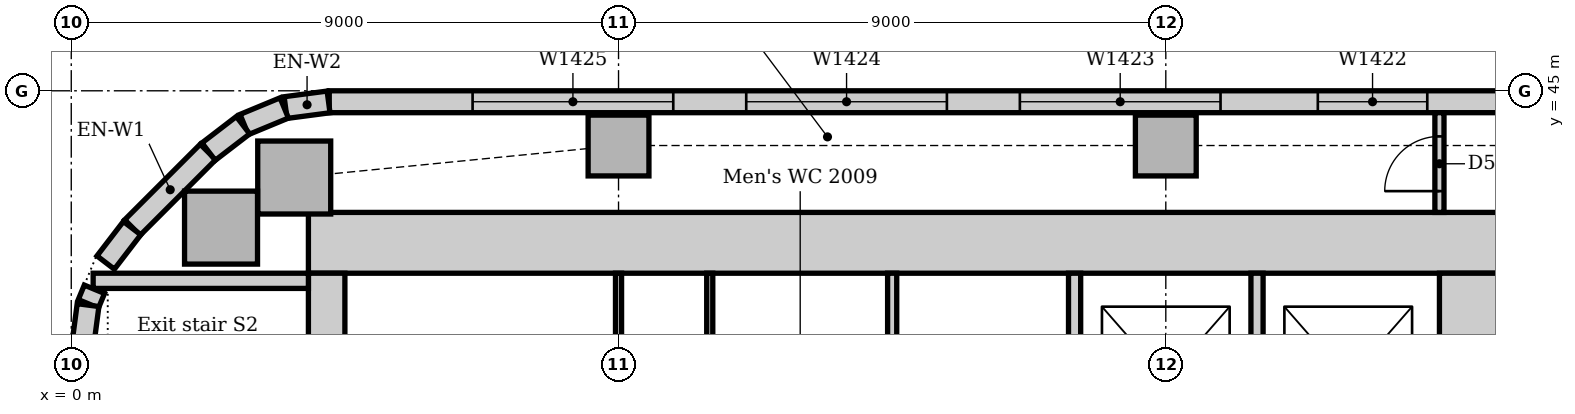
"""IFC4 building model, lengths in metres.
Left out: names, types, materials, properties, quantities, classifications, styles, units other than length and angle.
Written with IfcOpenShell. Run it as: python <this file> out.ifc"""

import sys

from ifc_helpers import new_model, si_unit, direction, frame, frame_2d, origin, origin_2d, place, context, subcontext, project, spatial, rectangle, extrude, element, fill, save


model = new_model("IFC4")
c1 = context("Model", 3, precision=1e-05, world=origin(), true_north=direction((0.0, 1.0)))
c2 = subcontext(c1, "Body", "Model", "MODEL_VIEW")
j1 = project(units=[si_unit("LENGTHUNIT", "METRE"), si_unit("PLANEANGLEUNIT", "RADIAN")], contexts=[c1])
p1 = place(None, origin())
s1 = spatial("IfcSite", under=j1, at=p1, CompositionType="ELEMENT")
p2 = place(p1, origin())
s2 = spatial("IfcBuilding", under=s1, at=p2, CompositionType="ELEMENT")
p3 = place(p2, frame((0.0, 0.0, 87.0)))
s3 = spatial("IfcBuildingStorey", under=s2, at=p3, CompositionType="ELEMENT", Elevation=87.0)
p4 = place(p3, frame((23.5, 42.5, 0.0), z_axis=(0.0, 0.0, 1.0), x_axis=(-1.0, 0.0, 0.0)))
e1 = element("IfcWall", 1, at=p4, inside=s3, PredefinedType="SOLIDWALL", context=c2, shape_type="SweptSolid", body=[
    extrude(rectangle(XDim=19.6, YDim=1.0, at=frame_2d((9.8, 0.0))), origin(), (0.0, 0.0, 1.0), 4.0),
])
p5 = place(p3, frame((23.0, 31.5, 0.0), z_axis=(0.0, 0.0, 1.0), x_axis=(0.0, 1.0, 0.0)))
e2 = element("IfcWall", 2, at=p5, inside=s3, PredefinedType="SOLIDWALL", context=c2, shape_type="SweptSolid", body=[
    extrude(rectangle(XDim=10.5, YDim=1.0, at=frame_2d((5.25, 0.0))), origin(), (0.0, 0.0, 1.0), 4.0),
])
p6 = place(p5, frame((3.15, 0.0, 0.0)))
e3 = element("IfcOpeningElement", 3, at=p6, cuts=e2, PredefinedType="OPENING", context=c2, shape_type="SweptSolid", body=[
    extrude(rectangle(XDim=1.0, YDim=2.1, at=frame_2d((0.5, 1.05))), frame((0.0, 0.51, 0.0), z_axis=(0.0, -1.0, 0.0), x_axis=(1.0, 0.0, 0.0)), (0.0, 0.0, 1.0), 1.02),
])
p7 = place(p5, frame((5.2, 0.0, 0.0)))
e4 = element("IfcOpeningElement", 4, at=p7, cuts=e2, PredefinedType="OPENING", context=c2, shape_type="SweptSolid", body=[
    extrude(rectangle(XDim=1.0, YDim=2.1, at=frame_2d((0.5, 1.05))), frame((0.0, 0.51, 0.0), z_axis=(0.0, -1.0, 0.0), x_axis=(1.0, 0.0, 0.0)), (0.0, 0.0, 1.0), 1.02),
])
p8 = place(p3, frame((4.2, 42.0, 0.0), z_axis=(0.0, 0.0, 1.0), x_axis=(0.0, -1.0, 0.0)))
e5 = element("IfcWall", 5, at=p8, inside=s3, PredefinedType="SOLIDWALL", context=c2, shape_type="SweptSolid", body=[
    extrude(rectangle(XDim=10.5, YDim=0.6, at=frame_2d((5.25, 0.0))), origin(), (0.0, 0.0, 1.0), 4.0),
])
p9 = place(p8, frame((5.3, 0.0, 0.0)))
e6 = element("IfcOpeningElement", 6, at=p9, cuts=e5, PredefinedType="OPENING", context=c2, shape_type="SweptSolid", body=[
    extrude(rectangle(XDim=1.0, YDim=2.1, at=frame_2d((0.5, 1.05))), frame((0.0, 0.31, 0.0), z_axis=(0.0, -1.0, 0.0), x_axis=(1.0, 0.0, 0.0)), (0.0, 0.0, 1.0), 0.62),
])
p10 = place(p3, frame((3.9, 41.875, 0.0), z_axis=(0.0, 0.0, 1.0), x_axis=(-1.0, 0.0, 0.0)))
e7 = element("IfcWall", 7, at=p10, inside=s3, PredefinedType="SOLIDWALL", context=c2, shape_type="SweptSolid", body=[
    extrude(rectangle(XDim=3.54, YDim=0.25, at=frame_2d((1.77, 0.0))), origin(), (0.0, 0.0, 1.0), 4.0),
])
for number, where, z_axis, x_axis in (
    (8, (3.667, 43.574, 0.0), (0.0, 0.0, 1.0), (1.0, 0.0, 0.0)),
    (9, (2.463, 42.75, 0.0), (0.0, 0.0, 1.0), (1.0, 0.0, 0.0)),
):
    element("IfcColumn", number, at=place(p3, frame(where, z_axis=z_axis, x_axis=x_axis)), inside=s3, PredefinedType="COLUMN", context=c2, shape_type="SweptSolid", body=[
        extrude(rectangle(XDim=1.2, YDim=1.2, at=origin_2d()), origin(), (0.0, 0.0, 1.0), 3.85),
    ])
for number, where, z_axis, x_axis in (
    (10, (9.0, 44.1, 0.0), (0.0, 0.0, 1.0), (1.0, 0.0, 0.0)),
    (11, (18.0, 44.1, 0.0), (0.0, 0.0, 1.0), (1.0, 0.0, 0.0)),
):
    element("IfcColumn", number, at=place(p3, frame(where, z_axis=z_axis, x_axis=x_axis)), inside=s3, PredefinedType="COLUMN", context=c2, shape_type="SweptSolid", body=[
        extrude(rectangle(XDim=1.0, YDim=1.0, at=origin_2d()), origin(), (0.0, 0.0, 1.0), 3.85),
    ])
p11 = place(p3, frame((48.257, 44.82, 0.0), z_axis=(0.0, 0.0, 1.0), x_axis=(-1.0, 0.0, 0.0)))
e12 = element("IfcWall", 12, at=p11, inside=s3, PredefinedType="STANDARD", context=c2, shape_type="SweptSolid", body=[
    extrude(rectangle(XDim=44.015, YDim=0.36, at=frame_2d((22.007, 0.0))), origin(), (0.0, 0.0, 1.0), 3.85),
])
p12 = place(p11, frame((2.057, 0.0, 0.9)))
e13 = element("IfcOpeningElement", 13, at=p12, cuts=e12, PredefinedType="OPENING", context=c2, shape_type="SweptSolid", body=[
    extrude(rectangle(XDim=3.3, YDim=1.6, at=frame_2d((1.65, 0.8))), frame((0.0, 0.19, 0.0), z_axis=(0.0, -1.0, 0.0), x_axis=(1.0, 0.0, 0.0)), (0.0, 0.0, 1.0), 0.38),
])
p13 = place(p11, frame((6.857, 0.0, 0.9)))
e14 = element("IfcOpeningElement", 14, at=p13, cuts=e12, PredefinedType="OPENING", context=c2, shape_type="SweptSolid", body=[
    extrude(rectangle(XDim=3.3, YDim=1.6, at=frame_2d((1.65, 0.8))), frame((0.0, 0.19, 0.0), z_axis=(0.0, -1.0, 0.0), x_axis=(1.0, 0.0, 0.0)), (0.0, 0.0, 1.0), 0.38),
])
p14 = place(p11, frame((11.357, 0.0, 0.9)))
e15 = element("IfcOpeningElement", 15, at=p14, cuts=e12, PredefinedType="OPENING", context=c2, shape_type="SweptSolid", body=[
    extrude(rectangle(XDim=3.3, YDim=1.6, at=frame_2d((1.65, 0.8))), frame((0.0, 0.19, 0.0), z_axis=(0.0, -1.0, 0.0), x_axis=(1.0, 0.0, 0.0)), (0.0, 0.0, 1.0), 0.38),
])
p15 = place(p11, frame((15.857, 0.0, 0.9)))
e16 = element("IfcOpeningElement", 16, at=p15, cuts=e12, PredefinedType="OPENING", context=c2, shape_type="SweptSolid", body=[
    extrude(rectangle(XDim=3.3, YDim=1.6, at=frame_2d((1.65, 0.8))), frame((0.0, 0.19, 0.0), z_axis=(0.0, -1.0, 0.0), x_axis=(1.0, 0.0, 0.0)), (0.0, 0.0, 1.0), 0.38),
])
p16 = place(p11, frame((20.357, 0.0, 0.9)))
e17 = element("IfcOpeningElement", 17, at=p16, cuts=e12, PredefinedType="OPENING", context=c2, shape_type="SweptSolid", body=[
    extrude(rectangle(XDim=3.3, YDim=1.6, at=frame_2d((1.65, 0.8))), frame((0.0, 0.19, 0.0), z_axis=(0.0, -1.0, 0.0), x_axis=(1.0, 0.0, 0.0)), (0.0, 0.0, 1.0), 0.38),
])
p17 = place(p11, frame((25.957, 0.0, 0.9)))
e18 = element("IfcOpeningElement", 18, at=p17, cuts=e12, PredefinedType="OPENING", context=c2, shape_type="SweptSolid", body=[
    extrude(rectangle(XDim=1.8, YDim=1.6, at=frame_2d((0.9, 0.8))), frame((0.0, 0.19, 0.0), z_axis=(0.0, -1.0, 0.0), x_axis=(1.0, 0.0, 0.0)), (0.0, 0.0, 1.0), 0.38),
])
p18 = place(p11, frame((29.357, 0.0, 0.9)))
e19 = element("IfcOpeningElement", 19, at=p18, cuts=e12, PredefinedType="OPENING", context=c2, shape_type="SweptSolid", body=[
    extrude(rectangle(XDim=3.3, YDim=1.6, at=frame_2d((1.65, 0.8))), frame((0.0, 0.19, 0.0), z_axis=(0.0, -1.0, 0.0), x_axis=(1.0, 0.0, 0.0)), (0.0, 0.0, 1.0), 0.38),
])
p19 = place(p11, frame((33.857, 0.0, 0.9)))
e20 = element("IfcOpeningElement", 20, at=p19, cuts=e12, PredefinedType="OPENING", context=c2, shape_type="SweptSolid", body=[
    extrude(rectangle(XDim=3.3, YDim=1.6, at=frame_2d((1.65, 0.8))), frame((0.0, 0.19, 0.0), z_axis=(0.0, -1.0, 0.0), x_axis=(1.0, 0.0, 0.0)), (0.0, 0.0, 1.0), 0.38),
])
p20 = place(p11, frame((38.357, 0.0, 0.9)))
e21 = element("IfcOpeningElement", 21, at=p20, cuts=e12, PredefinedType="OPENING", context=c2, shape_type="SweptSolid", body=[
    extrude(rectangle(XDim=3.3, YDim=1.6, at=frame_2d((1.65, 0.8))), frame((0.0, 0.19, 0.0), z_axis=(0.0, -1.0, 0.0), x_axis=(1.0, 0.0, 0.0)), (0.0, 0.0, 1.0), 0.38),
])
p21 = place(p3, frame((2.249, 43.994, 0.0), z_axis=(0.0, 0.0, 1.0), x_axis=(-0.707106781187, -0.707106781187, 0.0)))
e22 = element("IfcWall", 22, at=p21, inside=s3, PredefinedType="STANDARD", context=c2, shape_type="SweptSolid", body=[
    extrude(rectangle(XDim=1.757, YDim=0.36, at=frame_2d((0.879, 0.0))), origin(), (0.0, 0.0, 1.0), 3.85),
])
for number, where, z_axis, x_axis in (
    (23, (4.231, 44.817, 0.0), (0.0, 0.0, 1.0), (-0.991, -0.131, 0.0)),
    (24, (3.503, 44.718, 0.0), (0.0, 0.0, 1.0), (-0.924, -0.383, 0.0)),
):
    element("IfcWall", number, at=place(p3, frame(where, z_axis=z_axis, x_axis=x_axis)), inside=s3, PredefinedType="STANDARD", context=c2, shape_type="SweptSolid", body=[
        extrude(rectangle(XDim=0.713, YDim=0.36, at=frame_2d((0.356, 0.0))), origin(), (0.0, 0.0, 1.0), 3.85),
    ])
for number, where, z_axis, x_axis in (
    (25, (2.825, 44.434, 0.0), (0.0, 0.0, 1.0), (-0.793, -0.609, 0.0)),
    (26, (1.0, 42.741, 0.0), (0.0, 0.0, 1.0), (-0.609, -0.793, 0.0)),
):
    element("IfcWall", number, at=place(p3, frame(where, z_axis=z_axis, x_axis=x_axis)), inside=s3, PredefinedType="STANDARD", context=c2, shape_type="SweptSolid", body=[
        extrude(rectangle(XDim=0.713, YDim=0.36, at=frame_2d((0.357, 0.0))), origin(), (0.0, 0.0, 1.0), 3.85),
    ])
p22 = place(p3, frame((0.381, 41.736, 0.0), z_axis=(0.0, 0.0, 1.0), x_axis=(-0.382773360986, -0.923842277729, 0.0)))
e27 = element("IfcWall", 27, at=p22, inside=s3, PredefinedType="STANDARD", context=c2, shape_type="SweptSolid", body=[
    extrude(rectangle(XDim=0.258, YDim=0.36, at=frame_2d((0.129, 0.0))), origin(), (0.0, 0.0, 1.0), 3.85),
])
p23 = place(p3, frame((0.276, 41.476, 0.0), z_axis=(0.0, 0.0, 1.0), x_axis=(-0.13055608231, -0.99144092581, 0.0)))
e28 = element("IfcWall", 28, at=p23, inside=s3, PredefinedType="STANDARD", context=c2, shape_type="SweptSolid", body=[
    extrude(rectangle(XDim=0.713, YDim=0.36, at=frame_2d((0.356, 0.0))), origin(), (0.0, 0.0, 1.0), 3.85),
])
for number, where, z_axis, x_axis in (
    (29, (16.5, 38.6, 0.0), (0.0, 0.0, 1.0), (0.0, 1.0, 0.0)),
    (30, (19.5, 38.6, 0.0), (0.0, 0.0, 1.0), (0.0, 1.0, 0.0)),
):
    element("IfcWall", number, at=place(p3, frame(where, z_axis=z_axis, x_axis=x_axis)), inside=s3, PredefinedType="PARTITIONING", context=c2, shape_type="SweptSolid", body=[
        extrude(rectangle(XDim=3.4, YDim=0.2, at=frame_2d((1.7, 0.0))), origin(), (0.0, 0.0, 1.0), 3.85),
    ])
p24 = place(p3, frame((22.5, 43.0, 0.0), z_axis=(0.0, 0.0, 1.0), x_axis=(0.0, 1.0, 0.0)))
e31 = element("IfcWall", 31, at=p24, inside=s3, PredefinedType="PARTITIONING", context=c2, shape_type="SweptSolid", body=[
    extrude(rectangle(XDim=1.64, YDim=0.15, at=frame_2d((0.82, 0.0))), origin(), (0.0, 0.0, 1.0), 3.85),
])
p25 = place(p24, frame((0.35, 0.0, 0.0)))
e32 = element("IfcOpeningElement", 32, at=p25, cuts=e31, PredefinedType="OPENING", context=c2, shape_type="SweptSolid", body=[
    extrude(rectangle(XDim=0.9, YDim=2.1, at=frame_2d((0.45, 1.05))), frame((0.0, 0.085, 0.0), z_axis=(0.0, -1.0, 0.0), x_axis=(1.0, 0.0, 0.0)), (0.0, 0.0, 1.0), 0.17),
])
p26 = place(p3, frame((13.5, 38.575, 0.0), z_axis=(0.0, 0.0, 1.0), x_axis=(0.0, 1.0, 0.0)))
e33 = element("IfcWall", 33, at=p26, inside=s3, PredefinedType="PARTITIONING", context=c2, shape_type="SweptSolid", body=[
    extrude(rectangle(XDim=3.425, YDim=0.15, at=frame_2d((1.712, 0.0))), origin(), (0.0, 0.0, 1.0), 3.85),
])
for number, where, z_axis, x_axis in (
    (34, (9.0, 38.575, 0.0), (0.0, 0.0, 1.0), (0.0, 1.0, 0.0)),
    (35, (10.5, 38.575, 0.0), (0.0, 0.0, 1.0), (0.0, 1.0, 0.0)),
):
    element("IfcWall", number, at=place(p3, frame(where, z_axis=z_axis, x_axis=x_axis)), inside=s3, PredefinedType="PARTITIONING", context=c2, shape_type="SweptSolid", body=[
        extrude(rectangle(XDim=3.425, YDim=0.1, at=frame_2d((1.712, 0.0))), origin(), (0.0, 0.0, 1.0), 3.85),
    ])
p27 = place(p17, origin())
e36 = element("IfcWindow", 36, at=p27, inside=s3, PartitioningType="SINGLE_PANEL", PredefinedType="WINDOW", context=c2, shape_type="SweptSolid", body=[
    extrude(rectangle(XDim=1.8, YDim=1.6, at=frame_2d((0.9, 0.8))), frame((0.0, 0.13, 0.0), z_axis=(0.0, -1.0, 0.0), x_axis=(1.0, 0.0, 0.0)), (0.0, 0.0, 1.0), 0.06),
])
fill(e18, e36)
p28 = place(p18, origin())
e37 = element("IfcWindow", 37, at=p28, inside=s3, PartitioningType="SINGLE_PANEL", PredefinedType="WINDOW", context=c2, shape_type="SweptSolid", body=[
    extrude(rectangle(XDim=3.3, YDim=1.6, at=frame_2d((1.65, 0.8))), frame((0.0, 0.13, 0.0), z_axis=(0.0, -1.0, 0.0), x_axis=(1.0, 0.0, 0.0)), (0.0, 0.0, 1.0), 0.06),
])
fill(e19, e37)
p29 = place(p19, origin())
e38 = element("IfcWindow", 38, at=p29, inside=s3, PartitioningType="SINGLE_PANEL", PredefinedType="WINDOW", context=c2, shape_type="SweptSolid", body=[
    extrude(rectangle(XDim=3.3, YDim=1.6, at=frame_2d((1.65, 0.8))), frame((0.0, 0.13, 0.0), z_axis=(0.0, -1.0, 0.0), x_axis=(1.0, 0.0, 0.0)), (0.0, 0.0, 1.0), 0.06),
])
fill(e20, e38)
p30 = place(p20, origin())
e39 = element("IfcWindow", 39, at=p30, inside=s3, PartitioningType="SINGLE_PANEL", PredefinedType="WINDOW", context=c2, shape_type="SweptSolid", body=[
    extrude(rectangle(XDim=3.3, YDim=1.6, at=frame_2d((1.65, 0.8))), frame((0.0, 0.13, 0.0), z_axis=(0.0, -1.0, 0.0), x_axis=(1.0, 0.0, 0.0)), (0.0, 0.0, 1.0), 0.06),
])
fill(e21, e39)
p31 = place(p25, origin())
e40 = element("IfcDoor", 40, at=p31, inside=s3, OperationType="SINGLE_SWING_LEFT", PredefinedType="DOOR", context=c2, shape_type="SweptSolid", body=[
    extrude(rectangle(XDim=0.9, YDim=2.1, at=frame_2d((0.45, 1.05))), frame((0.0, 0.025, 0.0), z_axis=(0.0, -1.0, 0.0), x_axis=(1.0, 0.0, 0.0)), (0.0, 0.0, 1.0), 0.05),
])
fill(e32, e40)
save(model, sys.argv[1])
